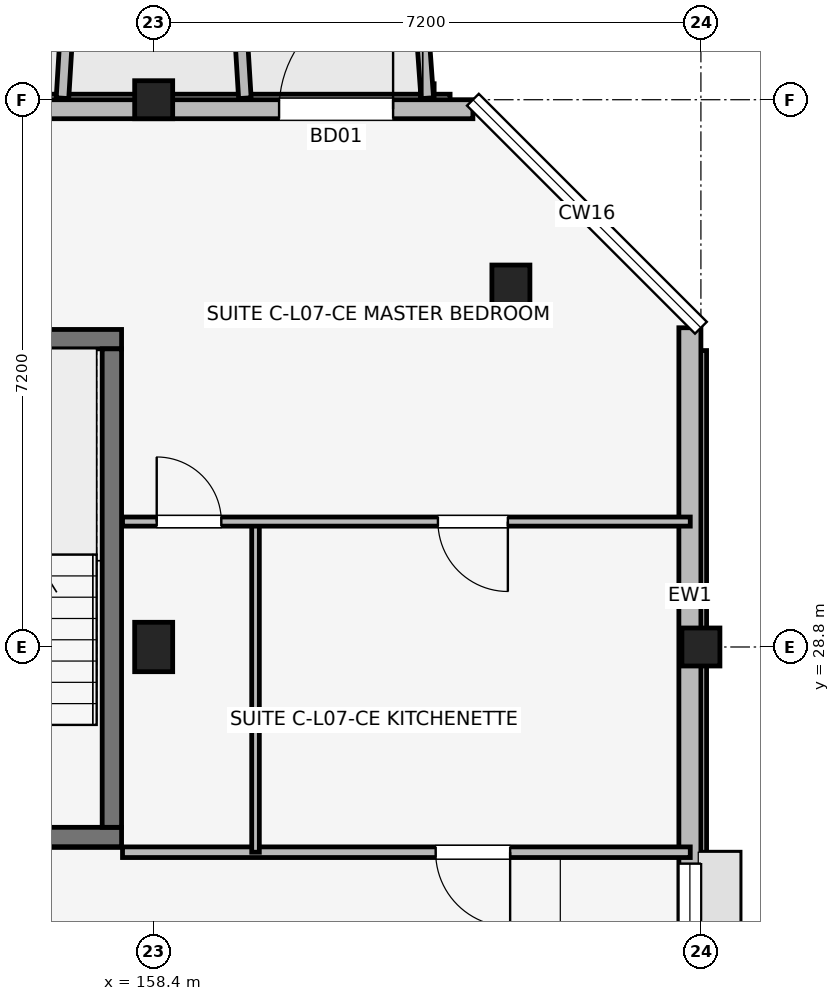
"""IFC4 building model, lengths in metres.
Left out: names, types, materials, properties, quantities, classifications, styles, units other than length and angle.
Written with IfcOpenShell. Run it as: python <this file> out.ifc"""

import sys

from ifc_helpers import new_model, si_unit, direction, frame, frame_2d, origin, origin_2d, place, context, subcontext, project, spatial, rectangle, extrude, element, fill, save


model = new_model("IFC4")
c1 = context("Model", 3, precision=1e-05, world=origin(), true_north=direction((0.0, 1.0)))
c2 = subcontext(c1, "Body", "Model", "MODEL_VIEW")
j1 = project(units=[si_unit("LENGTHUNIT", "METRE"), si_unit("PLANEANGLEUNIT", "RADIAN")], contexts=[c1])
p1 = place(None, origin())
s1 = spatial("IfcSite", under=j1, at=p1, CompositionType="ELEMENT")
p2 = place(p1, origin())
s2 = spatial("IfcBuilding", under=s1, at=p2, CompositionType="ELEMENT")
p3 = place(p2, frame((0.0, 0.0, 24.45)))
s3 = spatial("IfcBuildingStorey", under=s2, at=p3, CompositionType="ELEMENT", Elevation=24.45)
p4 = place(p3, frame((158.4, 28.8, 0.0), z_axis=(0.0, 0.0, 1.0), x_axis=(1.0, 0.0, 0.0)))
e1 = element("IfcColumn", 1, at=p4, inside=s3, PredefinedType="COLUMN", context=c2, shape_type="SweptSolid", body=[
    extrude(rectangle(XDim=0.5, YDim=0.65, at=origin_2d()), origin(), (0.0, 0.0, 1.0), 3.15),
])
for number, where, z_axis, x_axis in (
    (2, (158.4, 36.0, 0.0), (0.0, 0.0, 1.0), (1.0, 0.0, 0.0)),
    (3, (165.6, 28.8, 0.0), (0.0, 0.0, 1.0), (1.0, 0.0, 0.0)),
):
    element("IfcColumn", number, at=place(p3, frame(where, z_axis=z_axis, x_axis=x_axis)), inside=s3, PredefinedType="COLUMN", context=c2, shape_type="SweptSolid", body=[
        extrude(rectangle(XDim=0.5, YDim=0.5, at=origin_2d()), origin(), (0.0, 0.0, 1.0), 3.15),
    ])
p5 = place(p3, frame((163.1, 33.5, 0.0), z_axis=(0.0, 0.0, 1.0), x_axis=(1.0, 0.0, 0.0)))
e4 = element("IfcColumn", 4, at=p5, inside=s3, PredefinedType="COLUMN", context=c2, shape_type="SweptSolid", body=[
    extrude(rectangle(XDim=0.5, YDim=0.65, at=origin_2d()), origin(), (0.0, 0.0, 1.0), 3.15),
])
p6 = place(p3, frame((154.673, 26.3, 0.0), z_axis=(0.0, 0.0, 1.0), x_axis=(1.0, 0.0, 0.0)))
e5 = element("IfcWall", 5, at=p6, inside=s3, PredefinedType="SHEAR", context=c2, shape_type="SweptSolid", body=[
    extrude(rectangle(XDim=3.305, YDim=0.255, at=frame_2d((1.652, 0.0))), origin(), (0.0, 0.0, 1.0), 3.15),
])
p7 = place(p6, frame((1.127, 0.0, 0.0)))
e6 = element("IfcOpeningElement", 6, at=p7, cuts=e5, PredefinedType="OPENING", context=c2, shape_type="SweptSolid", body=[
    extrude(rectangle(XDim=1.05, YDim=2.12, at=frame_2d((0.525, 1.06))), frame((0.0, 0.137, 0.0), z_axis=(0.0, -1.0, 0.0), x_axis=(1.0, 0.0, 0.0)), (0.0, 0.0, 1.0), 0.275),
])
p8 = place(p3, frame((154.673, 32.85, 0.0), z_axis=(0.0, 0.0, 1.0), x_axis=(1.0, 0.0, 0.0)))
e7 = element("IfcWall", 7, at=p8, inside=s3, PredefinedType="SHEAR", context=c2, shape_type="SweptSolid", body=[
    extrude(rectangle(XDim=3.305, YDim=0.255, at=frame_2d((1.652, 0.0))), origin(), (0.0, 0.0, 1.0), 3.15),
])
p9 = place(p3, frame((157.85, 26.427, 0.0), z_axis=(0.0, 0.0, 1.0), x_axis=(0.0, 1.0, 0.0)))
e8 = element("IfcWall", 8, at=p9, inside=s3, PredefinedType="SHEAR", context=c2, shape_type="SweptSolid", body=[
    extrude(rectangle(XDim=6.295, YDim=0.255, at=frame_2d((3.147, 0.0))), origin(), (0.0, 0.0, 1.0), 3.15),
])
p10 = place(p3, frame((165.455, 17.4, 0.0), z_axis=(0.0, 0.0, 1.0), x_axis=(0.0, 1.0, 0.0)))
e9 = element("IfcWall", 9, at=p10, inside=s3, PredefinedType="SOLIDWALL", context=c2, shape_type="SweptSolid", body=[
    extrude(rectangle(XDim=15.6, YDim=0.29, at=frame_2d((7.8, 0.0))), origin(), (0.0, 0.0, 1.0), 2.43),
])
p11 = place(p10, frame((7.05, 0.0, 1.05)))
e10 = element("IfcOpeningElement", 10, at=p11, cuts=e9, PredefinedType="OPENING", context=c2, shape_type="SweptSolid", body=[
    extrude(rectangle(XDim=1.5, YDim=1.15, at=frame_2d((0.75, 0.575))), frame((0.0, 0.155, 0.0), z_axis=(0.0, -1.0, 0.0), x_axis=(1.0, 0.0, 0.0)), (0.0, 0.0, 1.0), 0.31),
])
p12 = place(p10, frame((1.255, 0.0, 0.72)))
e11 = element("IfcOpeningElement", 11, at=p12, cuts=e9, PredefinedType="OPENING", context=c2, shape_type="SweptSolid", body=[
    extrude(rectangle(XDim=1.42, YDim=1.6, at=frame_2d((0.71, 0.8))), frame((0.0, 0.155, 0.0), z_axis=(0.0, -1.0, 0.0), x_axis=(1.0, 0.0, 0.0)), (0.0, 0.0, 1.0), 0.31),
])
p13 = place(p3, frame((162.6, 35.875, 0.0), z_axis=(0.0, 0.0, 1.0), x_axis=(-1.0, 0.0, 0.0)))
e12 = element("IfcWall", 12, at=p13, inside=s3, PredefinedType="SOLIDWALL", context=c2, shape_type="SweptSolid", body=[
    extrude(rectangle(XDim=30.0, YDim=0.25, at=frame_2d((15.0, 0.0))), origin(), (0.0, 0.0, 1.0), 2.43),
])
p14 = place(p13, frame((29.1, 0.0, 0.0), z_axis=(0.0, 0.0, 1.0), x_axis=(-1.0, 0.0, 0.0)))
e13 = element("IfcOpeningElement", 13, at=p14, cuts=e12, PredefinedType="OPENING", context=c2, shape_type="SweptSolid", body=[
    extrude(rectangle(XDim=1.8, YDim=2.15, at=frame_2d((0.9, 1.075))), frame((0.0, 0.135, 0.0), z_axis=(0.0, -1.0, 0.0), x_axis=(1.0, 0.0, 0.0)), (0.0, 0.0, 1.0), 0.27),
])
p15 = place(p13, frame((2.55, 0.0, 0.0), z_axis=(0.0, 0.0, 1.0), x_axis=(-1.0, 0.0, 0.0)))
e14 = element("IfcOpeningElement", 14, at=p15, cuts=e12, PredefinedType="OPENING", context=c2, shape_type="SweptSolid", body=[
    extrude(rectangle(XDim=1.5, YDim=2.15, at=frame_2d((0.75, 1.075))), frame((0.0, 0.135, 0.0), z_axis=(0.0, -1.0, 0.0), x_axis=(1.0, 0.0, 0.0)), (0.0, 0.0, 1.0), 0.27),
])
p16 = place(p13, frame((15.355, 0.0, 0.5)))
e15 = element("IfcOpeningElement", 15, at=p16, cuts=e12, PredefinedType="OPENING", context=c2, shape_type="SweptSolid", body=[
    extrude(rectangle(XDim=0.9, YDim=1.8, at=frame_2d((0.45, 0.9))), frame((0.0, 0.135, 0.0), z_axis=(0.0, -1.0, 0.0), x_axis=(1.0, 0.0, 0.0)), (0.0, 0.0, 1.0), 0.27),
])
p17 = place(p13, frame((8.145, 0.0, 0.7)))
e16 = element("IfcOpeningElement", 16, at=p17, cuts=e12, PredefinedType="OPENING", context=c2, shape_type="SweptSolid", body=[
    extrude(rectangle(XDim=1.86, YDim=1.6, at=frame_2d((0.93, 0.8))), frame((0.0, 0.135, 0.0), z_axis=(0.0, -1.0, 0.0), x_axis=(1.0, 0.0, 0.0)), (0.0, 0.0, 1.0), 0.27),
])
p18 = place(p13, frame((19.97, 0.0, 0.7)))
e17 = element("IfcOpeningElement", 17, at=p18, cuts=e12, PredefinedType="OPENING", context=c2, shape_type="SweptSolid", body=[
    extrude(rectangle(XDim=1.86, YDim=1.6, at=frame_2d((0.93, 0.8))), frame((0.0, 0.135, 0.0), z_axis=(0.0, -1.0, 0.0), x_axis=(1.0, 0.0, 0.0)), (0.0, 0.0, 1.0), 0.27),
])
p19 = place(p3, frame((157.2, 36.02, 0.0), z_axis=(0.0, 0.0, 1.0), x_axis=(0.061170732449, 0.998127317276, 0.0)))
e18 = element("IfcWall", 18, at=p19, inside=s3, PredefinedType="ELEMENTEDWALL", context=c2, shape_type="SweptSolid", body=[
    extrude(rectangle(XDim=1.964, YDim=0.165, at=frame_2d((0.982, 0.0))), origin(), (0.0, 0.0, 1.0), 2.53),
])
p20 = place(p3, frame((159.6, 36.02, 0.0), z_axis=(0.0, 0.0, 1.0), x_axis=(-0.061170732449, 0.998127317276, 0.0)))
e19 = element("IfcWall", 19, at=p20, inside=s3, PredefinedType="ELEMENTEDWALL", context=c2, shape_type="SweptSolid", body=[
    extrude(rectangle(XDim=1.964, YDim=0.165, at=frame_2d((0.982, 0.0))), origin(), (0.0, 0.0, 1.0), 2.95),
])
p21 = place(p3, frame((162.0, 36.02, 0.0), z_axis=(0.0, 0.0, 1.0), x_axis=(-0.071194071069, 0.997462482625, 0.0)))
e20 = element("IfcWall", 20, at=p21, inside=s3, PredefinedType="ELEMENTEDWALL", context=c2, shape_type="SweptSolid", body=[
    extrude(rectangle(XDim=1.965, YDim=0.165, at=frame_2d((0.982, 0.0))), origin(), (0.0, 0.0, 1.0), 2.95),
])
p22 = place(p3, frame((157.99, 26.1, 0.0), z_axis=(0.0, 0.0, 1.0), x_axis=(1.0, 0.0, 0.0)))
e21 = element("IfcWall", 21, at=p22, inside=s3, PredefinedType="PARTITIONING", context=c2, shape_type="SweptSolid", body=[
    extrude(rectangle(XDim=7.47, YDim=0.14, at=frame_2d((3.735, 0.0))), origin(), (0.0, 0.0, 1.0), 2.38),
])
p23 = place(p22, frame((5.1, 0.0, 0.0), z_axis=(0.0, 0.0, 1.0), x_axis=(-1.0, 0.0, 0.0)))
e22 = element("IfcOpeningElement", 22, at=p23, cuts=e21, PredefinedType="OPENING", context=c2, shape_type="SweptSolid", body=[
    extrude(rectangle(XDim=0.98, YDim=2.1, at=frame_2d((0.49, 1.05))), frame((0.0, 0.08, 0.0), z_axis=(0.0, -1.0, 0.0), x_axis=(1.0, 0.0, 0.0)), (0.0, 0.0, 1.0), 0.16),
])
p24 = place(p3, frame((159.74, 26.1, 0.0), z_axis=(0.0, 0.0, 1.0), x_axis=(0.0, 1.0, 0.0)))
e23 = element("IfcWall", 23, at=p24, inside=s3, PredefinedType="PARTITIONING", context=c2, shape_type="SweptSolid", body=[
    extrude(rectangle(XDim=4.35, YDim=0.1, at=frame_2d((2.175, 0.0))), origin(), (0.0, 0.0, 1.0), 2.38),
])
p25 = place(p3, frame((157.99, 30.45, 0.0), z_axis=(0.0, 0.0, 1.0), x_axis=(1.0, 0.0, 0.0)))
e24 = element("IfcWall", 24, at=p25, inside=s3, PredefinedType="PARTITIONING", context=c2, shape_type="SweptSolid", body=[
    extrude(rectangle(XDim=7.47, YDim=0.12, at=frame_2d((3.735, 0.0))), origin(), (0.0, 0.0, 1.0), 2.38),
])
p26 = place(p25, frame((0.45, 0.0, 0.0)))
e25 = element("IfcOpeningElement", 25, at=p26, cuts=e24, PredefinedType="OPENING", context=c2, shape_type="SweptSolid", body=[
    extrude(rectangle(XDim=0.85, YDim=2.08, at=frame_2d((0.425, 1.04))), frame((0.0, 0.07, 0.0), z_axis=(0.0, -1.0, 0.0), x_axis=(1.0, 0.0, 0.0)), (0.0, 0.0, 1.0), 0.14),
])
p27 = place(p25, frame((5.07, 0.0, 0.0), z_axis=(0.0, 0.0, 1.0), x_axis=(-1.0, 0.0, 0.0)))
e26 = element("IfcOpeningElement", 26, at=p27, cuts=e24, PredefinedType="OPENING", context=c2, shape_type="SweptSolid", body=[
    extrude(rectangle(XDim=0.92, YDim=2.08, at=frame_2d((0.46, 1.04))), frame((0.0, 0.07, 0.0), z_axis=(0.0, -1.0, 0.0), x_axis=(1.0, 0.0, 0.0)), (0.0, 0.0, 1.0), 0.14),
])
p28 = place(p15, origin())
e27 = element("IfcDoor", 27, at=p28, inside=s3, OperationType="SINGLE_SWING_LEFT", PredefinedType="DOOR", context=c2, shape_type="SweptSolid", body=[
    extrude(rectangle(XDim=1.5, YDim=2.15, at=frame_2d((0.75, 1.075))), frame((0.0, 0.025, 0.0), z_axis=(0.0, -1.0, 0.0), x_axis=(1.0, 0.0, 0.0)), (0.0, 0.0, 1.0), 0.05),
])
fill(e14, e27)
p29 = place(p11, origin())
e28 = element("IfcWindow", 28, at=p29, inside=s3, PartitioningType="SINGLE_PANEL", PredefinedType="WINDOW", context=c2, shape_type="SweptSolid", body=[
    extrude(rectangle(XDim=1.5, YDim=1.15, at=frame_2d((0.75, 0.575))), frame((0.0, 0.03, 0.0), z_axis=(0.0, -1.0, 0.0), x_axis=(1.0, 0.0, 0.0)), (0.0, 0.0, 1.0), 0.06),
])
fill(e10, e28)
p30 = place(p23, origin())
e29 = element("IfcDoor", 29, at=p30, inside=s3, OperationType="SINGLE_SWING_RIGHT", PredefinedType="DOOR", context=c2, shape_type="SweptSolid", body=[
    extrude(rectangle(XDim=0.98, YDim=2.1, at=frame_2d((0.49, 1.05))), frame((0.0, 0.025, 0.0), z_axis=(0.0, -1.0, 0.0), x_axis=(1.0, 0.0, 0.0)), (0.0, 0.0, 1.0), 0.05),
])
fill(e22, e29)
p31 = place(p26, origin())
e30 = element("IfcDoor", 30, at=p31, inside=s3, OperationType="SINGLE_SWING_LEFT", PredefinedType="DOOR", context=c2, shape_type="SweptSolid", body=[
    extrude(rectangle(XDim=0.85, YDim=2.08, at=frame_2d((0.425, 1.04))), frame((0.0, 0.025, 0.0), z_axis=(0.0, -1.0, 0.0), x_axis=(1.0, 0.0, 0.0)), (0.0, 0.0, 1.0), 0.05),
])
fill(e25, e30)
p32 = place(p27, origin())
e31 = element("IfcDoor", 31, at=p32, inside=s3, OperationType="SINGLE_SWING_RIGHT", PredefinedType="DOOR", context=c2, shape_type="SweptSolid", body=[
    extrude(rectangle(XDim=0.92, YDim=2.08, at=frame_2d((0.46, 1.04))), frame((0.0, 0.025, 0.0), z_axis=(0.0, -1.0, 0.0), x_axis=(1.0, 0.0, 0.0)), (0.0, 0.0, 1.0), 0.05),
])
fill(e26, e31)
save(model, sys.argv[1])
